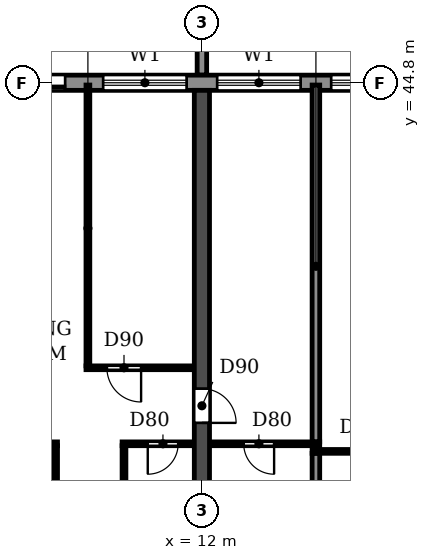
"""IFC4 building model, lengths in metres.
Left out: names, types, materials, properties, quantities, classifications, styles, units other than length and angle.
Written with IfcOpenShell. Run it as: python <this file> out.ifc"""

import sys

from ifc_helpers import new_model, si_unit, direction, frame, frame_2d, origin, place, context, subcontext, project, spatial, polyline, rectangle, outline, extrude, source, transform, mapped, element, fill, save


model = new_model("IFC4")
c1 = context("Model", 3, precision=1e-05, world=origin(), true_north=direction((0.0, 1.0)))
c2 = subcontext(c1, "Body", "Model", "MODEL_VIEW")
j1 = project(units=[si_unit("LENGTHUNIT", "METRE"), si_unit("PLANEANGLEUNIT", "RADIAN")], contexts=[c1])
p1 = place(None, origin())
s1 = spatial("IfcSite", under=j1, at=p1, CompositionType="ELEMENT")
p2 = place(p1, origin())
s2 = spatial("IfcBuilding", under=s1, at=p2, CompositionType="ELEMENT")
p3 = place(p2, frame((0.0, 0.0, 43.2)))
s3 = spatial("IfcBuildingStorey", under=s2, at=p3, CompositionType="ELEMENT", Elevation=43.2)
p4 = place(p3, frame((12.0, 30.55, 0.0), z_axis=(0.0, 0.0, 1.0), x_axis=(0.0, 1.0, 0.0)))
e1 = element("IfcWall", 1, at=p4, inside=s3, PredefinedType="SHEAR", context=c2, shape_type="SweptSolid", body=[
    extrude(rectangle(XDim=14.05, YDim=0.4, at=frame_2d((7.025, 0.0))), origin(), (0.0, 0.0, 1.0), 3.05),
])
p5 = place(p4, frame((5.3, 0.0, 0.0)))
e2 = element("IfcOpeningElement", 2, at=p5, cuts=e1, PredefinedType="OPENING", context=c2, shape_type="SweptSolid", body=[
    extrude(rectangle(XDim=0.9, YDim=2.1, at=frame_2d((0.45, 1.05))), frame((0.0, 0.21, 0.0), z_axis=(0.0, -1.0, 0.0), x_axis=(1.0, 0.0, 0.0)), (0.0, 0.0, 1.0), 0.42),
])
p6 = place(p3, frame((97.317, 44.8, 0.0), z_axis=(0.0, 0.0, 1.0), x_axis=(-1.0, 0.0, 0.0)))
e3 = element("IfcWall", 3, at=p6, inside=s3, PredefinedType="STANDARD", context=c2, shape_type="SweptSolid", body=[
    extrude(rectangle(XDim=92.634, YDim=0.4, at=frame_2d((46.317, 0.0))), origin(), (0.0, 0.0, 1.0), 3.05),
])
p7 = place(p6, frame((88.917, 0.0, 0.0)))
e4 = element("IfcOpeningElement", 4, at=p7, cuts=e3, PredefinedType="OPENING", context=c2, shape_type="SweptSolid", body=[
    extrude(rectangle(XDim=1.8, YDim=2.4, at=frame_2d((0.9, 1.2))), frame((0.0, 0.21, 0.0), z_axis=(0.0, -1.0, 0.0), x_axis=(1.0, 0.0, 0.0)), (0.0, 0.0, 1.0), 0.42),
])
p8 = place(p6, frame((85.717, 0.0, 0.9)))
e5 = element("IfcOpeningElement", 5, at=p8, cuts=e3, PredefinedType="OPENING", context=c2, shape_type="SweptSolid", body=[
    extrude(rectangle(XDim=2.2, YDim=1.5, at=frame_2d((1.1, 0.75))), frame((0.0, 0.21, 0.0), z_axis=(0.0, -1.0, 0.0), x_axis=(1.0, 0.0, 0.0)), (0.0, 0.0, 1.0), 0.42),
])
p9 = place(p6, frame((82.717, 0.0, 0.9)))
e6 = element("IfcOpeningElement", 6, at=p9, cuts=e3, PredefinedType="OPENING", context=c2, shape_type="SweptSolid", body=[
    extrude(rectangle(XDim=2.2, YDim=1.5, at=frame_2d((1.1, 0.75))), frame((0.0, 0.21, 0.0), z_axis=(0.0, -1.0, 0.0), x_axis=(1.0, 0.0, 0.0)), (0.0, 0.0, 1.0), 0.42),
])
p10 = place(p6, frame((79.717, 0.0, 0.9)))
e7 = element("IfcOpeningElement", 7, at=p10, cuts=e3, PredefinedType="OPENING", context=c2, shape_type="SweptSolid", body=[
    extrude(rectangle(XDim=2.2, YDim=1.5, at=frame_2d((1.1, 0.75))), frame((0.0, 0.21, 0.0), z_axis=(0.0, -1.0, 0.0), x_axis=(1.0, 0.0, 0.0)), (0.0, 0.0, 1.0), 0.42),
])
p11 = place(p6, frame((76.717, 0.0, 0.9)))
e8 = element("IfcOpeningElement", 8, at=p11, cuts=e3, PredefinedType="OPENING", context=c2, shape_type="SweptSolid", body=[
    extrude(rectangle(XDim=2.2, YDim=1.5, at=frame_2d((1.1, 0.75))), frame((0.0, 0.21, 0.0), z_axis=(0.0, -1.0, 0.0), x_axis=(1.0, 0.0, 0.0)), (0.0, 0.0, 1.0), 0.42),
])
p12 = place(p6, frame((73.917, 0.0, 0.0)))
e9 = element("IfcOpeningElement", 9, at=p12, cuts=e3, PredefinedType="OPENING", context=c2, shape_type="SweptSolid", body=[
    extrude(rectangle(XDim=1.8, YDim=2.4, at=frame_2d((0.9, 1.2))), frame((0.0, 0.21, 0.0), z_axis=(0.0, -1.0, 0.0), x_axis=(1.0, 0.0, 0.0)), (0.0, 0.0, 1.0), 0.42),
])
p13 = place(p6, frame((70.717, 0.0, 0.9)))
e10 = element("IfcOpeningElement", 10, at=p13, cuts=e3, PredefinedType="OPENING", context=c2, shape_type="SweptSolid", body=[
    extrude(rectangle(XDim=2.2, YDim=1.5, at=frame_2d((1.1, 0.75))), frame((0.0, 0.21, 0.0), z_axis=(0.0, -1.0, 0.0), x_axis=(1.0, 0.0, 0.0)), (0.0, 0.0, 1.0), 0.42),
])
p14 = place(p6, frame((67.717, 0.0, 0.9)))
e11 = element("IfcOpeningElement", 11, at=p14, cuts=e3, PredefinedType="OPENING", context=c2, shape_type="SweptSolid", body=[
    extrude(rectangle(XDim=2.2, YDim=1.5, at=frame_2d((1.1, 0.75))), frame((0.0, 0.21, 0.0), z_axis=(0.0, -1.0, 0.0), x_axis=(1.0, 0.0, 0.0)), (0.0, 0.0, 1.0), 0.42),
])
p15 = place(p6, frame((64.717, 0.0, 0.9)))
e12 = element("IfcOpeningElement", 12, at=p15, cuts=e3, PredefinedType="OPENING", context=c2, shape_type="SweptSolid", body=[
    extrude(rectangle(XDim=2.2, YDim=1.5, at=frame_2d((1.1, 0.75))), frame((0.0, 0.21, 0.0), z_axis=(0.0, -1.0, 0.0), x_axis=(1.0, 0.0, 0.0)), (0.0, 0.0, 1.0), 0.42),
])
p16 = place(p6, frame((61.917, 0.0, 0.0)))
e13 = element("IfcOpeningElement", 13, at=p16, cuts=e3, PredefinedType="OPENING", context=c2, shape_type="SweptSolid", body=[
    extrude(rectangle(XDim=1.8, YDim=2.4, at=frame_2d((0.9, 1.2))), frame((0.0, 0.21, 0.0), z_axis=(0.0, -1.0, 0.0), x_axis=(1.0, 0.0, 0.0)), (0.0, 0.0, 1.0), 0.42),
])
p17 = place(p6, frame((58.717, 0.0, 0.9)))
e14 = element("IfcOpeningElement", 14, at=p17, cuts=e3, PredefinedType="OPENING", context=c2, shape_type="SweptSolid", body=[
    extrude(rectangle(XDim=2.2, YDim=1.5, at=frame_2d((1.1, 0.75))), frame((0.0, 0.21, 0.0), z_axis=(0.0, -1.0, 0.0), x_axis=(1.0, 0.0, 0.0)), (0.0, 0.0, 1.0), 0.42),
])
p18 = place(p6, frame((55.717, 0.0, 0.9)))
e15 = element("IfcOpeningElement", 15, at=p18, cuts=e3, PredefinedType="OPENING", context=c2, shape_type="SweptSolid", body=[
    extrude(rectangle(XDim=2.2, YDim=1.5, at=frame_2d((1.1, 0.75))), frame((0.0, 0.21, 0.0), z_axis=(0.0, -1.0, 0.0), x_axis=(1.0, 0.0, 0.0)), (0.0, 0.0, 1.0), 0.42),
])
p19 = place(p6, frame((52.717, 0.0, 0.9)))
e16 = element("IfcOpeningElement", 16, at=p19, cuts=e3, PredefinedType="OPENING", context=c2, shape_type="SweptSolid", body=[
    extrude(rectangle(XDim=2.2, YDim=1.5, at=frame_2d((1.1, 0.75))), frame((0.0, 0.21, 0.0), z_axis=(0.0, -1.0, 0.0), x_axis=(1.0, 0.0, 0.0)), (0.0, 0.0, 1.0), 0.42),
])
p20 = place(p6, frame((49.917, 0.0, 0.0)))
e17 = element("IfcOpeningElement", 17, at=p20, cuts=e3, PredefinedType="OPENING", context=c2, shape_type="SweptSolid", body=[
    extrude(rectangle(XDim=1.8, YDim=2.4, at=frame_2d((0.9, 1.2))), frame((0.0, 0.21, 0.0), z_axis=(0.0, -1.0, 0.0), x_axis=(1.0, 0.0, 0.0)), (0.0, 0.0, 1.0), 0.42),
])
p21 = place(p6, frame((46.717, 0.0, 0.9)))
e18 = element("IfcOpeningElement", 18, at=p21, cuts=e3, PredefinedType="OPENING", context=c2, shape_type="SweptSolid", body=[
    extrude(rectangle(XDim=2.2, YDim=1.5, at=frame_2d((1.1, 0.75))), frame((0.0, 0.21, 0.0), z_axis=(0.0, -1.0, 0.0), x_axis=(1.0, 0.0, 0.0)), (0.0, 0.0, 1.0), 0.42),
])
p22 = place(p6, frame((43.717, 0.0, 0.9)))
e19 = element("IfcOpeningElement", 19, at=p22, cuts=e3, PredefinedType="OPENING", context=c2, shape_type="SweptSolid", body=[
    extrude(rectangle(XDim=2.2, YDim=1.5, at=frame_2d((1.1, 0.75))), frame((0.0, 0.21, 0.0), z_axis=(0.0, -1.0, 0.0), x_axis=(1.0, 0.0, 0.0)), (0.0, 0.0, 1.0), 0.42),
])
p23 = place(p6, frame((40.717, 0.0, 0.9)))
e20 = element("IfcOpeningElement", 20, at=p23, cuts=e3, PredefinedType="OPENING", context=c2, shape_type="SweptSolid", body=[
    extrude(rectangle(XDim=2.2, YDim=1.5, at=frame_2d((1.1, 0.75))), frame((0.0, 0.21, 0.0), z_axis=(0.0, -1.0, 0.0), x_axis=(1.0, 0.0, 0.0)), (0.0, 0.0, 1.0), 0.42),
])
p24 = place(p6, frame((37.917, 0.0, 0.0)))
e21 = element("IfcOpeningElement", 21, at=p24, cuts=e3, PredefinedType="OPENING", context=c2, shape_type="SweptSolid", body=[
    extrude(rectangle(XDim=1.8, YDim=2.4, at=frame_2d((0.9, 1.2))), frame((0.0, 0.21, 0.0), z_axis=(0.0, -1.0, 0.0), x_axis=(1.0, 0.0, 0.0)), (0.0, 0.0, 1.0), 0.42),
])
p25 = place(p6, frame((34.717, 0.0, 0.9)))
e22 = element("IfcOpeningElement", 22, at=p25, cuts=e3, PredefinedType="OPENING", context=c2, shape_type="SweptSolid", body=[
    extrude(rectangle(XDim=2.2, YDim=1.5, at=frame_2d((1.1, 0.75))), frame((0.0, 0.21, 0.0), z_axis=(0.0, -1.0, 0.0), x_axis=(1.0, 0.0, 0.0)), (0.0, 0.0, 1.0), 0.42),
])
p26 = place(p6, frame((31.717, 0.0, 0.9)))
e23 = element("IfcOpeningElement", 23, at=p26, cuts=e3, PredefinedType="OPENING", context=c2, shape_type="SweptSolid", body=[
    extrude(rectangle(XDim=2.2, YDim=1.5, at=frame_2d((1.1, 0.75))), frame((0.0, 0.21, 0.0), z_axis=(0.0, -1.0, 0.0), x_axis=(1.0, 0.0, 0.0)), (0.0, 0.0, 1.0), 0.42),
])
p27 = place(p6, frame((28.717, 0.0, 0.9)))
e24 = element("IfcOpeningElement", 24, at=p27, cuts=e3, PredefinedType="OPENING", context=c2, shape_type="SweptSolid", body=[
    extrude(rectangle(XDim=2.2, YDim=1.5, at=frame_2d((1.1, 0.75))), frame((0.0, 0.21, 0.0), z_axis=(0.0, -1.0, 0.0), x_axis=(1.0, 0.0, 0.0)), (0.0, 0.0, 1.0), 0.42),
])
p28 = place(p6, frame((25.917, 0.0, 0.0)))
e25 = element("IfcOpeningElement", 25, at=p28, cuts=e3, PredefinedType="OPENING", context=c2, shape_type="SweptSolid", body=[
    extrude(rectangle(XDim=1.8, YDim=2.4, at=frame_2d((0.9, 1.2))), frame((0.0, 0.21, 0.0), z_axis=(0.0, -1.0, 0.0), x_axis=(1.0, 0.0, 0.0)), (0.0, 0.0, 1.0), 0.42),
])
p29 = place(p6, frame((22.917, 0.0, 0.0)))
e26 = element("IfcOpeningElement", 26, at=p29, cuts=e3, PredefinedType="OPENING", context=c2, shape_type="SweptSolid", body=[
    extrude(rectangle(XDim=1.8, YDim=2.4, at=frame_2d((0.9, 1.2))), frame((0.0, 0.21, 0.0), z_axis=(0.0, -1.0, 0.0), x_axis=(1.0, 0.0, 0.0)), (0.0, 0.0, 1.0), 0.42),
])
p30 = place(p6, frame((19.717, 0.0, 0.9)))
e27 = element("IfcOpeningElement", 27, at=p30, cuts=e3, PredefinedType="OPENING", context=c2, shape_type="SweptSolid", body=[
    extrude(rectangle(XDim=2.2, YDim=1.5, at=frame_2d((1.1, 0.75))), frame((0.0, 0.21, 0.0), z_axis=(0.0, -1.0, 0.0), x_axis=(1.0, 0.0, 0.0)), (0.0, 0.0, 1.0), 0.42),
])
p31 = place(p6, frame((16.717, 0.0, 0.9)))
e28 = element("IfcOpeningElement", 28, at=p31, cuts=e3, PredefinedType="OPENING", context=c2, shape_type="SweptSolid", body=[
    extrude(rectangle(XDim=2.2, YDim=1.5, at=frame_2d((1.1, 0.75))), frame((0.0, 0.21, 0.0), z_axis=(0.0, -1.0, 0.0), x_axis=(1.0, 0.0, 0.0)), (0.0, 0.0, 1.0), 0.42),
])
p32 = place(p6, frame((13.717, 0.0, 0.9)))
e29 = element("IfcOpeningElement", 29, at=p32, cuts=e3, PredefinedType="OPENING", context=c2, shape_type="SweptSolid", body=[
    extrude(rectangle(XDim=2.2, YDim=1.5, at=frame_2d((1.1, 0.75))), frame((0.0, 0.21, 0.0), z_axis=(0.0, -1.0, 0.0), x_axis=(1.0, 0.0, 0.0)), (0.0, 0.0, 1.0), 0.42),
])
p33 = place(p6, frame((10.717, 0.0, 0.9)))
e30 = element("IfcOpeningElement", 30, at=p33, cuts=e3, PredefinedType="OPENING", context=c2, shape_type="SweptSolid", body=[
    extrude(rectangle(XDim=2.2, YDim=1.5, at=frame_2d((1.1, 0.75))), frame((0.0, 0.21, 0.0), z_axis=(0.0, -1.0, 0.0), x_axis=(1.0, 0.0, 0.0)), (0.0, 0.0, 1.0), 0.42),
])
p34 = place(p6, frame((7.917, 0.0, 0.0)))
e31 = element("IfcOpeningElement", 31, at=p34, cuts=e3, PredefinedType="OPENING", context=c2, shape_type="SweptSolid", body=[
    extrude(rectangle(XDim=1.8, YDim=2.4, at=frame_2d((0.9, 1.2))), frame((0.0, 0.21, 0.0), z_axis=(0.0, -1.0, 0.0), x_axis=(1.0, 0.0, 0.0)), (0.0, 0.0, 1.0), 0.42),
])
p35 = place(p6, frame((4.717, 0.0, 0.9)))
e32 = element("IfcOpeningElement", 32, at=p35, cuts=e3, PredefinedType="OPENING", context=c2, shape_type="SweptSolid", body=[
    extrude(rectangle(XDim=2.2, YDim=1.5, at=frame_2d((1.1, 0.75))), frame((0.0, 0.21, 0.0), z_axis=(0.0, -1.0, 0.0), x_axis=(1.0, 0.0, 0.0)), (0.0, 0.0, 1.0), 0.42),
])
p36 = place(p6, frame((1.917, 0.0, 0.0)))
e33 = element("IfcOpeningElement", 33, at=p36, cuts=e3, PredefinedType="OPENING", context=c2, shape_type="SweptSolid", body=[
    extrude(rectangle(XDim=1.8, YDim=2.4, at=frame_2d((0.9, 1.2))), frame((0.0, 0.21, 0.0), z_axis=(0.0, -1.0, 0.0), x_axis=(1.0, 0.0, 0.0)), (0.0, 0.0, 1.0), 0.42),
])
m1 = source(origin(), c2, "Body", "SweptSolid", [
    extrude(outline(polyline([(0.0, 0.0), (0.25, 0.0), (0.25, 3.1), (0.0, 3.1), (0.0, 0.0)])), origin(), (0.0, 0.0, 1.0), 3.1),
])
p37 = place(p3, frame((11.875, 45.0, 0.0)))
e34 = element("IfcWall", 34, at=p37, inside=s3, PredefinedType="STANDARD", context=c2, shape_type="MappedRepresentation", body=[
    mapped(m1, transform((0.0, 0.0, 0.0))),
])
p38 = place(p3, frame((15.0, 30.56, 0.0), z_axis=(0.0, 0.0, 1.0), x_axis=(0.0, 1.0, 0.0)))
e35 = element("IfcWall", 35, at=p38, inside=s3, PredefinedType="PARTITIONING", context=c2, shape_type="SweptSolid", body=[
    extrude(rectangle(XDim=4.49, YDim=0.2, at=frame_2d((2.245, 0.0))), origin(), (0.0, 0.0, 1.0), 3.05),
])
p39 = place(p3, frame((15.0, 35.35, 0.0), z_axis=(0.0, 0.0, 1.0), x_axis=(0.0, 1.0, 0.0)))
e36 = element("IfcWall", 36, at=p39, inside=s3, PredefinedType="PARTITIONING", context=c2, shape_type="SweptSolid", body=[
    extrude(rectangle(XDim=9.39, YDim=0.2, at=frame_2d((4.695, 0.0))), origin(), (0.0, 0.0, 1.0), 3.05),
])
p40 = place(p3, frame((14.9, 35.1, 0.0), z_axis=(0.0, 0.0, 1.0), x_axis=(1.0, 0.0, 0.0)))
e37 = element("IfcWall", 37, at=p40, inside=s3, PredefinedType="PARTITIONING", context=c2, shape_type="SweptSolid", body=[
    extrude(rectangle(XDim=2.89, YDim=0.1, at=frame_2d((1.445, 0.0))), origin(), (0.0, 0.0, 1.0), 3.05),
])
p41 = place(p40, frame((1.2, 0.0, 0.0)))
e38 = element("IfcOpeningElement", 38, at=p41, cuts=e37, PredefinedType="OPENING", context=c2, shape_type="SweptSolid", body=[
    extrude(rectangle(XDim=0.8, YDim=2.1, at=frame_2d((0.4, 1.05))), frame((0.0, 0.06, 0.0), z_axis=(0.0, -1.0, 0.0), x_axis=(1.0, 0.0, 0.0)), (0.0, 0.0, 1.0), 0.12),
])
p42 = place(p3, frame((6.21, 35.3, 0.0), z_axis=(0.0, 0.0, 1.0), x_axis=(1.0, 0.0, 0.0)))
e39 = element("IfcWall", 39, at=p42, inside=s3, PredefinedType="PARTITIONING", context=c2, shape_type="SweptSolid", body=[
    extrude(rectangle(XDim=1.99, YDim=0.1, at=frame_2d((0.995, 0.0))), origin(), (0.0, 0.0, 1.0), 3.05),
])
p43 = place(p42, frame((0.415, 0.0, 0.0)))
e40 = element("IfcOpeningElement", 40, at=p43, cuts=e39, PredefinedType="OPENING", context=c2, shape_type="SweptSolid", body=[
    extrude(rectangle(XDim=0.9, YDim=2.1, at=frame_2d((0.45, 1.05))), frame((0.0, 0.06, 0.0), z_axis=(0.0, -1.0, 0.0), x_axis=(1.0, 0.0, 0.0)), (0.0, 0.0, 1.0), 0.12),
])
p44 = place(p3, frame((9.9, 35.3, 0.0), z_axis=(0.0, 0.0, 1.0), x_axis=(1.0, 0.0, 0.0)))
e41 = element("IfcWall", 41, at=p44, inside=s3, PredefinedType="PARTITIONING", context=c2, shape_type="SweptSolid", body=[
    extrude(rectangle(XDim=1.89, YDim=0.1, at=frame_2d((0.945, 0.0))), origin(), (0.0, 0.0, 1.0), 3.05),
])
p45 = place(p44, frame((0.675, 0.0, 0.0)))
e42 = element("IfcOpeningElement", 42, at=p45, cuts=e41, PredefinedType="OPENING", context=c2, shape_type="SweptSolid", body=[
    extrude(rectangle(XDim=0.8, YDim=2.1, at=frame_2d((0.4, 1.05))), frame((0.0, 0.06, 0.0), z_axis=(0.0, -1.0, 0.0), x_axis=(1.0, 0.0, 0.0)), (0.0, 0.0, 1.0), 0.12),
])
p46 = place(p3, frame((12.21, 35.3, 0.0), z_axis=(0.0, 0.0, 1.0), x_axis=(1.0, 0.0, 0.0)))
e43 = element("IfcWall", 43, at=p46, inside=s3, PredefinedType="PARTITIONING", context=c2, shape_type="SweptSolid", body=[
    extrude(rectangle(XDim=2.89, YDim=0.1, at=frame_2d((1.445, 0.0))), origin(), (0.0, 0.0, 1.0), 3.05),
])
p47 = place(p46, frame((0.89, 0.0, 0.0)))
e44 = element("IfcOpeningElement", 44, at=p47, cuts=e43, PredefinedType="OPENING", context=c2, shape_type="SweptSolid", body=[
    extrude(rectangle(XDim=0.8, YDim=2.1, at=frame_2d((0.4, 1.05))), frame((0.0, 0.06, 0.0), z_axis=(0.0, -1.0, 0.0), x_axis=(1.0, 0.0, 0.0)), (0.0, 0.0, 1.0), 0.12),
])
p48 = place(p3, frame((8.95, 37.3, 0.0), z_axis=(0.0, 0.0, 1.0), x_axis=(1.0, 0.0, 0.0)))
e45 = element("IfcWall", 45, at=p48, inside=s3, PredefinedType="PARTITIONING", context=c2, shape_type="SweptSolid", body=[
    extrude(rectangle(XDim=2.84, YDim=0.1, at=frame_2d((1.42, 0.0))), origin(), (0.0, 0.0, 1.0), 3.05),
])
p49 = place(p48, frame((0.55, 0.0, 0.0)))
e46 = element("IfcOpeningElement", 46, at=p49, cuts=e45, PredefinedType="OPENING", context=c2, shape_type="SweptSolid", body=[
    extrude(rectangle(XDim=0.9, YDim=2.1, at=frame_2d((0.45, 1.05))), frame((0.0, 0.06, 0.0), z_axis=(0.0, -1.0, 0.0), x_axis=(1.0, 0.0, 0.0)), (0.0, 0.0, 1.0), 0.12),
])
p50 = place(p3, frame((8.15, 30.56, 0.0), z_axis=(0.0, 0.0, 1.0), x_axis=(0.0, 1.0, 0.0)))
e47 = element("IfcWall", 47, at=p50, inside=s3, PredefinedType="PARTITIONING", context=c2, shape_type="SweptSolid", body=[
    extrude(rectangle(XDim=4.69, YDim=0.1, at=frame_2d((2.345, 0.0))), origin(), (0.0, 0.0, 1.0), 3.05),
])
p51 = place(p3, frame((9.0, 37.35, 0.0), z_axis=(0.0, 0.0, 1.0), x_axis=(0.0, 1.0, 0.0)))
e48 = element("IfcWall", 48, at=p51, inside=s3, PredefinedType="PARTITIONING", context=c2, shape_type="SweptSolid", body=[
    extrude(rectangle(XDim=7.39, YDim=0.1, at=frame_2d((3.695, 0.0))), origin(), (0.0, 0.0, 1.0), 3.05),
])
p52 = place(p3, frame((9.95, 30.56, 0.0), z_axis=(0.0, 0.0, 1.0), x_axis=(0.0, 1.0, 0.0)))
e49 = element("IfcWall", 49, at=p52, inside=s3, PredefinedType="PARTITIONING", context=c2, shape_type="SweptSolid", body=[
    extrude(rectangle(XDim=4.69, YDim=0.1, at=frame_2d((2.345, 0.0))), origin(), (0.0, 0.0, 1.0), 3.05),
])
p53 = place(p7, origin())
e50 = element("IfcDoor", 50, at=p53, inside=s3, OperationType="DOUBLE_DOOR_SLIDING", PredefinedType="DOOR", context=c2, shape_type="SweptSolid", body=[
    extrude(rectangle(XDim=1.8, YDim=2.4, at=frame_2d((0.9, 1.2))), frame((0.0, 0.025, 0.0), z_axis=(0.0, -1.0, 0.0), x_axis=(1.0, 0.0, 0.0)), (0.0, 0.0, 1.0), 0.05),
])
fill(e4, e50)
p54 = place(p8, origin())
e51 = element("IfcWindow", 51, at=p54, inside=s3, PartitioningType="DOUBLE_PANEL_HORIZONTAL", PredefinedType="WINDOW", context=c2, shape_type="SweptSolid", body=[
    extrude(rectangle(XDim=2.2, YDim=1.5, at=frame_2d((1.1, 0.75))), frame((0.0, 0.03, 0.0), z_axis=(0.0, -1.0, 0.0), x_axis=(1.0, 0.0, 0.0)), (0.0, 0.0, 1.0), 0.06),
])
fill(e5, e51)
p55 = place(p9, origin())
e52 = element("IfcWindow", 52, at=p55, inside=s3, PartitioningType="DOUBLE_PANEL_HORIZONTAL", PredefinedType="WINDOW", context=c2, shape_type="SweptSolid", body=[
    extrude(rectangle(XDim=2.2, YDim=1.5, at=frame_2d((1.1, 0.75))), frame((0.0, 0.03, 0.0), z_axis=(0.0, -1.0, 0.0), x_axis=(1.0, 0.0, 0.0)), (0.0, 0.0, 1.0), 0.06),
])
fill(e6, e52)
p56 = place(p10, origin())
e53 = element("IfcWindow", 53, at=p56, inside=s3, PartitioningType="DOUBLE_PANEL_HORIZONTAL", PredefinedType="WINDOW", context=c2, shape_type="SweptSolid", body=[
    extrude(rectangle(XDim=2.2, YDim=1.5, at=frame_2d((1.1, 0.75))), frame((0.0, 0.03, 0.0), z_axis=(0.0, -1.0, 0.0), x_axis=(1.0, 0.0, 0.0)), (0.0, 0.0, 1.0), 0.06),
])
fill(e7, e53)
p57 = place(p47, frame((0.8, 0.0, 0.0), z_axis=(0.0, 0.0, 1.0), x_axis=(-1.0, 0.0, 0.0)))
e54 = element("IfcDoor", 54, at=p57, inside=s3, OperationType="SINGLE_SWING_LEFT", PredefinedType="DOOR", context=c2, shape_type="SweptSolid", body=[
    extrude(rectangle(XDim=0.8, YDim=2.1, at=frame_2d((0.4, 1.05))), frame((0.0, 0.025, 0.0), z_axis=(0.0, -1.0, 0.0), x_axis=(1.0, 0.0, 0.0)), (0.0, 0.0, 1.0), 0.05),
])
fill(e44, e54)
p58 = place(p49, frame((0.9, 0.0, 0.0), z_axis=(0.0, 0.0, 1.0), x_axis=(-1.0, 0.0, 0.0)))
e55 = element("IfcDoor", 55, at=p58, inside=s3, OperationType="SINGLE_SWING_LEFT", PredefinedType="DOOR", context=c2, shape_type="SweptSolid", body=[
    extrude(rectangle(XDim=0.9, YDim=2.1, at=frame_2d((0.45, 1.05))), frame((0.0, 0.025, 0.0), z_axis=(0.0, -1.0, 0.0), x_axis=(1.0, 0.0, 0.0)), (0.0, 0.0, 1.0), 0.05),
])
fill(e46, e55)
p59 = place(p45, frame((0.8, 0.0, 0.0), z_axis=(0.0, 0.0, 1.0), x_axis=(-1.0, 0.0, 0.0)))
e56 = element("IfcDoor", 56, at=p59, inside=s3, OperationType="SINGLE_SWING_RIGHT", PredefinedType="DOOR", context=c2, shape_type="SweptSolid", body=[
    extrude(rectangle(XDim=0.8, YDim=2.1, at=frame_2d((0.4, 1.05))), frame((0.0, 0.025, 0.0), z_axis=(0.0, -1.0, 0.0), x_axis=(1.0, 0.0, 0.0)), (0.0, 0.0, 1.0), 0.05),
])
fill(e42, e56)
p60 = place(p5, frame((0.9, 0.0, 0.0), z_axis=(0.0, 0.0, 1.0), x_axis=(-1.0, 0.0, 0.0)))
e57 = element("IfcDoor", 57, at=p60, inside=s3, OperationType="SINGLE_SWING_RIGHT", PredefinedType="DOOR", context=c2, shape_type="SweptSolid", body=[
    extrude(rectangle(XDim=0.9, YDim=2.1, at=frame_2d((0.45, 1.05))), frame((0.0, 0.025, 0.0), z_axis=(0.0, -1.0, 0.0), x_axis=(1.0, 0.0, 0.0)), (0.0, 0.0, 1.0), 0.05),
])
fill(e2, e57)
save(model, sys.argv[1])
